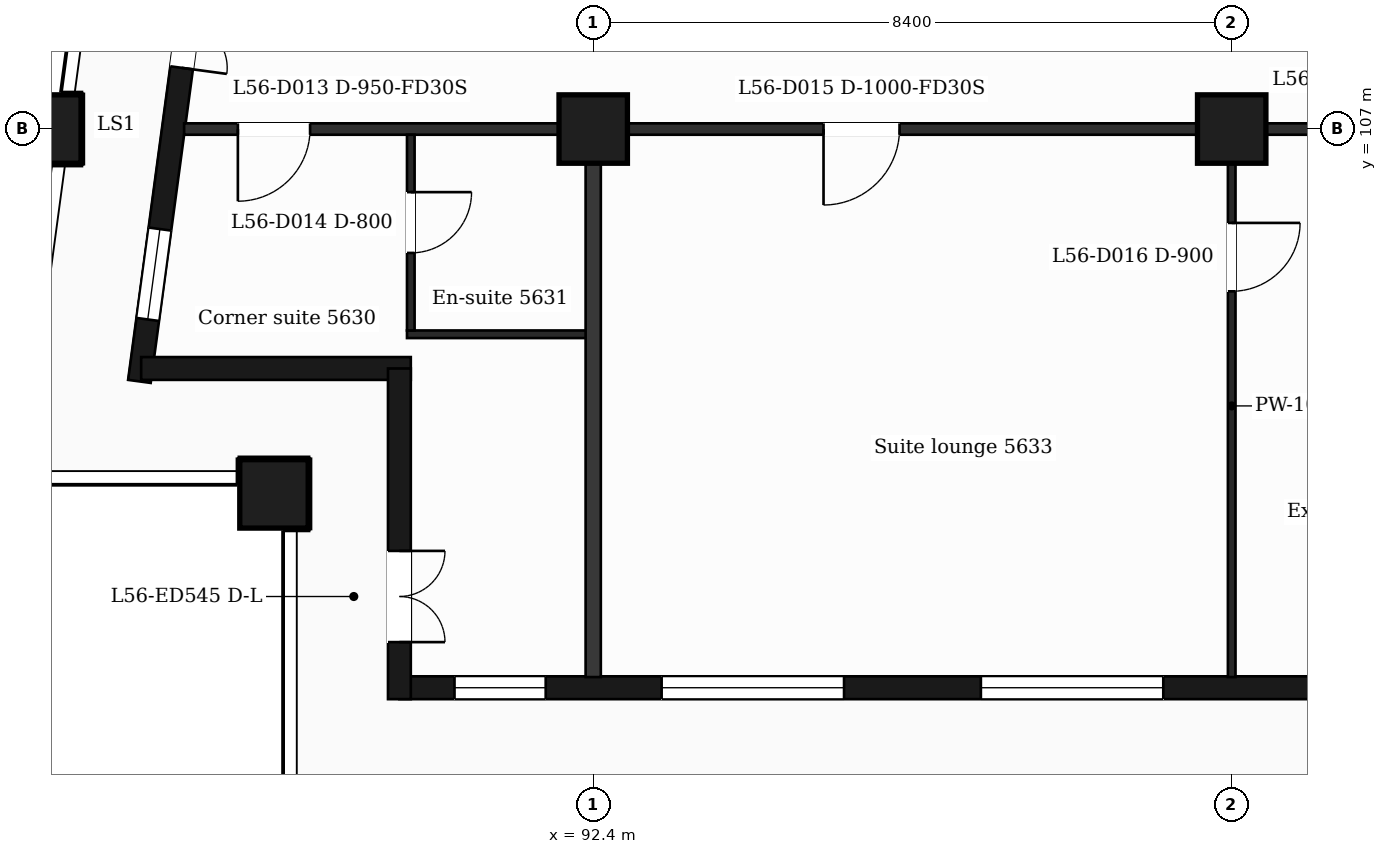
"""IFC4 building model, lengths in metres.
Left out: names, types, materials, properties, quantities, classifications, styles, units other than length and angle.
Written with IfcOpenShell. Run it as: python <this file> out.ifc"""

import sys

from ifc_helpers import new_model, si_unit, direction, frame, frame_2d, origin, origin_2d, place, context, subcontext, project, spatial, rectangle, extrude, element, fill, save


model = new_model("IFC4")
c1 = context("Model", 3, precision=1e-05, world=origin(), true_north=direction((0.0, 1.0)))
c2 = subcontext(c1, "Body", "Model", "MODEL_VIEW")
j1 = project(units=[si_unit("LENGTHUNIT", "METRE"), si_unit("PLANEANGLEUNIT", "RADIAN")], contexts=[c1])
p1 = place(None, origin())
s1 = spatial("IfcSite", under=j1, at=p1, CompositionType="ELEMENT")
p2 = place(p1, origin())
s2 = spatial("IfcBuilding", under=s1, at=p2, CompositionType="ELEMENT")
p3 = place(p2, frame((0.0, 0.0, 231.8)))
s3 = spatial("IfcBuildingStorey", under=s2, at=p3, CompositionType="ELEMENT", Elevation=231.8)
for number, where, z_axis, x_axis in (
    (1, (88.2, 102.2, 0.0), (0.0, 0.0, 1.0), (1.0, 0.0, 0.0)),
    (2, (92.4, 107.0, 0.0), (0.0, 0.0, 1.0), (1.0, 0.0, 0.0)),
    (3, (100.8, 107.0, 0.0), (0.0, 0.0, 1.0), (1.0, 0.0, 0.0)),
    (4, (85.211, 107.0, 0.0), (0.0, 0.0, 1.0), (1.0, 0.0, 0.0)),
):
    element("IfcColumn", number, at=place(p3, frame(where, z_axis=z_axis, x_axis=x_axis)), inside=s3, PredefinedType="COLUMN", context=c2, shape_type="SweptSolid", body=[
        extrude(rectangle(XDim=0.9, YDim=0.9, at=origin_2d()), origin(), (0.0, 0.0, 1.0), 3.7),
    ])
p4 = place(p3, frame((89.85, 99.65, 0.0), z_axis=(0.0, 0.0, 1.0), x_axis=(1.0, 0.0, 0.0)))
e5 = element("IfcWall", 5, at=p4, inside=s3, PredefinedType="SOLIDWALL", context=c2, shape_type="SweptSolid", body=[
    extrude(rectangle(XDim=47.25, YDim=0.3, at=frame_2d((23.625, 0.0))), origin(), (0.0, 0.0, 1.0), 3.38),
])
p5 = place(p4, frame((0.725, 0.0, 0.9)))
e6 = element("IfcOpeningElement", 6, at=p5, cuts=e5, PredefinedType="OPENING", context=c2, shape_type="SweptSolid", body=[
    extrude(rectangle(XDim=1.2, YDim=2.1, at=frame_2d((0.6, 1.05))), frame((0.0, 0.16, 0.0), z_axis=(0.0, -1.0, 0.0), x_axis=(1.0, 0.0, 0.0)), (0.0, 0.0, 1.0), 0.32),
])
p6 = place(p4, frame((3.45, 0.0, 0.9)))
e7 = element("IfcOpeningElement", 7, at=p6, cuts=e5, PredefinedType="OPENING", context=c2, shape_type="SweptSolid", body=[
    extrude(rectangle(XDim=2.4, YDim=2.1, at=frame_2d((1.2, 1.05))), frame((0.0, 0.16, 0.0), z_axis=(0.0, -1.0, 0.0), x_axis=(1.0, 0.0, 0.0)), (0.0, 0.0, 1.0), 0.32),
])
p7 = place(p4, frame((7.65, 0.0, 0.9)))
e8 = element("IfcOpeningElement", 8, at=p7, cuts=e5, PredefinedType="OPENING", context=c2, shape_type="SweptSolid", body=[
    extrude(rectangle(XDim=2.4, YDim=2.1, at=frame_2d((1.2, 1.05))), frame((0.0, 0.16, 0.0), z_axis=(0.0, -1.0, 0.0), x_axis=(1.0, 0.0, 0.0)), (0.0, 0.0, 1.0), 0.32),
])
p8 = place(p4, frame((12.45, 0.0, 0.9)))
e9 = element("IfcOpeningElement", 9, at=p8, cuts=e5, PredefinedType="OPENING", context=c2, shape_type="SweptSolid", body=[
    extrude(rectangle(XDim=1.2, YDim=2.1, at=frame_2d((0.6, 1.05))), frame((0.0, 0.16, 0.0), z_axis=(0.0, -1.0, 0.0), x_axis=(1.0, 0.0, 0.0)), (0.0, 0.0, 1.0), 0.32),
])
p9 = place(p4, frame((16.65, 0.0, 0.9)))
e10 = element("IfcOpeningElement", 10, at=p9, cuts=e5, PredefinedType="OPENING", context=c2, shape_type="SweptSolid", body=[
    extrude(rectangle(XDim=1.2, YDim=2.1, at=frame_2d((0.6, 1.05))), frame((0.0, 0.16, 0.0), z_axis=(0.0, -1.0, 0.0), x_axis=(1.0, 0.0, 0.0)), (0.0, 0.0, 1.0), 0.32),
])
p10 = place(p4, frame((19.95, 0.0, 0.0)))
e11 = element("IfcOpeningElement", 11, at=p10, cuts=e5, PredefinedType="OPENING", context=c2, shape_type="SweptSolid", body=[
    extrude(rectangle(XDim=1.2, YDim=2.4, at=frame_2d((0.6, 1.2))), frame((0.0, 0.16, 0.0), z_axis=(0.0, -1.0, 0.0), x_axis=(1.0, 0.0, 0.0)), (0.0, 0.0, 1.0), 0.32),
])
p11 = place(p4, frame((21.75, 0.0, 0.9)))
e12 = element("IfcOpeningElement", 12, at=p11, cuts=e5, PredefinedType="OPENING", context=c2, shape_type="SweptSolid", body=[
    extrude(rectangle(XDim=1.2, YDim=2.1, at=frame_2d((0.6, 1.05))), frame((0.0, 0.16, 0.0), z_axis=(0.0, -1.0, 0.0), x_axis=(1.0, 0.0, 0.0)), (0.0, 0.0, 1.0), 0.32),
])
p12 = place(p4, frame((24.45, 0.0, 0.9)))
e13 = element("IfcOpeningElement", 13, at=p12, cuts=e5, PredefinedType="OPENING", context=c2, shape_type="SweptSolid", body=[
    extrude(rectangle(XDim=2.4, YDim=2.1, at=frame_2d((1.2, 1.05))), frame((0.0, 0.16, 0.0), z_axis=(0.0, -1.0, 0.0), x_axis=(1.0, 0.0, 0.0)), (0.0, 0.0, 1.0), 0.32),
])
p13 = place(p4, frame((28.35, 0.0, 0.0)))
e14 = element("IfcOpeningElement", 14, at=p13, cuts=e5, PredefinedType="OPENING", context=c2, shape_type="SweptSolid", body=[
    extrude(rectangle(XDim=1.2, YDim=2.4, at=frame_2d((0.6, 1.2))), frame((0.0, 0.16, 0.0), z_axis=(0.0, -1.0, 0.0), x_axis=(1.0, 0.0, 0.0)), (0.0, 0.0, 1.0), 0.32),
])
p14 = place(p4, frame((30.15, 0.0, 0.9)))
e15 = element("IfcOpeningElement", 15, at=p14, cuts=e5, PredefinedType="OPENING", context=c2, shape_type="SweptSolid", body=[
    extrude(rectangle(XDim=1.2, YDim=2.1, at=frame_2d((0.6, 1.05))), frame((0.0, 0.16, 0.0), z_axis=(0.0, -1.0, 0.0), x_axis=(1.0, 0.0, 0.0)), (0.0, 0.0, 1.0), 0.32),
])
p15 = place(p4, frame((32.85, 0.0, 0.9)))
e16 = element("IfcOpeningElement", 16, at=p15, cuts=e5, PredefinedType="OPENING", context=c2, shape_type="SweptSolid", body=[
    extrude(rectangle(XDim=2.4, YDim=2.1, at=frame_2d((1.2, 1.05))), frame((0.0, 0.16, 0.0), z_axis=(0.0, -1.0, 0.0), x_axis=(1.0, 0.0, 0.0)), (0.0, 0.0, 1.0), 0.32),
])
p16 = place(p4, frame((37.05, 0.0, 0.9)))
e17 = element("IfcOpeningElement", 17, at=p16, cuts=e5, PredefinedType="OPENING", context=c2, shape_type="SweptSolid", body=[
    extrude(rectangle(XDim=2.4, YDim=2.1, at=frame_2d((1.2, 1.05))), frame((0.0, 0.16, 0.0), z_axis=(0.0, -1.0, 0.0), x_axis=(1.0, 0.0, 0.0)), (0.0, 0.0, 1.0), 0.32),
])
p17 = place(p4, frame((41.85, 0.0, 0.9)))
e18 = element("IfcOpeningElement", 18, at=p17, cuts=e5, PredefinedType="OPENING", context=c2, shape_type="SweptSolid", body=[
    extrude(rectangle(XDim=1.2, YDim=2.1, at=frame_2d((0.6, 1.05))), frame((0.0, 0.16, 0.0), z_axis=(0.0, -1.0, 0.0), x_axis=(1.0, 0.0, 0.0)), (0.0, 0.0, 1.0), 0.32),
])
p18 = place(p4, frame((45.25, 0.0, 0.9)))
e19 = element("IfcOpeningElement", 19, at=p18, cuts=e5, PredefinedType="OPENING", context=c2, shape_type="SweptSolid", body=[
    extrude(rectangle(XDim=1.2, YDim=2.1, at=frame_2d((0.6, 1.05))), frame((0.0, 0.16, 0.0), z_axis=(0.0, -1.0, 0.0), x_axis=(1.0, 0.0, 0.0)), (0.0, 0.0, 1.0), 0.32),
])
p19 = place(p3, frame((87.334, 110.4, 0.0), z_axis=(0.0, 0.0, 1.0), x_axis=(-0.133437175554, -0.991057273915, 0.0)))
e20 = element("IfcWall", 20, at=p19, inside=s3, PredefinedType="SOLIDWALL", context=c2, shape_type="SweptSolid", body=[
    extrude(rectangle(XDim=6.781, YDim=0.3, at=frame_2d((3.39, 0.0))), origin(), (0.0, 0.0, 1.0), 3.38),
])
p20 = place(p19, frame((1.418, 0.0, 0.0)))
e21 = element("IfcOpeningElement", 21, at=p20, cuts=e20, PredefinedType="OPENING", context=c2, shape_type="SweptSolid", body=[
    extrude(rectangle(XDim=1.2, YDim=2.4, at=frame_2d((0.6, 1.2))), frame((0.0, 0.16, 0.0), z_axis=(0.0, -1.0, 0.0), x_axis=(1.0, 0.0, 0.0)), (0.0, 0.0, 1.0), 0.32),
])
p21 = place(p19, frame((4.758, 0.0, 0.9)))
e22 = element("IfcOpeningElement", 22, at=p21, cuts=e20, PredefinedType="OPENING", context=c2, shape_type="SweptSolid", body=[
    extrude(rectangle(XDim=1.2, YDim=2.1, at=frame_2d((0.6, 1.05))), frame((0.0, 0.16, 0.0), z_axis=(0.0, -1.0, 0.0), x_axis=(1.0, 0.0, 0.0)), (0.0, 0.0, 1.0), 0.32),
])
p22 = place(p3, frame((86.452, 103.85, 0.0), z_axis=(0.0, 0.0, 1.0), x_axis=(1.0, 0.0, 0.0)))
e23 = element("IfcWall", 23, at=p22, inside=s3, PredefinedType="SOLIDWALL", context=c2, shape_type="SweptSolid", body=[
    extrude(rectangle(XDim=3.548, YDim=0.3, at=frame_2d((1.774, 0.0))), origin(), (0.0, 0.0, 1.0), 3.38),
])
p23 = place(p3, frame((89.85, 103.85, 0.0), z_axis=(0.0, 0.0, 1.0), x_axis=(0.0, -1.0, 0.0)))
e24 = element("IfcWall", 24, at=p23, inside=s3, PredefinedType="SOLIDWALL", context=c2, shape_type="SweptSolid", body=[
    extrude(rectangle(XDim=4.35, YDim=0.3, at=frame_2d((2.175, 0.0))), origin(), (0.0, 0.0, 1.0), 3.38),
])
p24 = place(p23, frame((2.4, 0.0, 0.0)))
e25 = element("IfcOpeningElement", 25, at=p24, cuts=e24, PredefinedType="OPENING", context=c2, shape_type="SweptSolid", body=[
    extrude(rectangle(XDim=1.2, YDim=2.4, at=frame_2d((0.6, 1.2))), frame((0.0, 0.16, 0.0), z_axis=(0.0, -1.0, 0.0), x_axis=(1.0, 0.0, 0.0)), (0.0, 0.0, 1.0), 0.32),
])
p25 = place(p3, frame((89.95, 104.3, 0.0), z_axis=(0.0, 0.0, 1.0), x_axis=(1.0, 0.0, 0.0)))
e26 = element("IfcWall", 26, at=p25, inside=s3, PredefinedType="PARTITIONING", context=c2, shape_type="SweptSolid", body=[
    extrude(rectangle(XDim=2.45, YDim=0.1, at=frame_2d((1.225, 0.0))), origin(), (0.0, 0.0, 1.0), 3.38),
])
p26 = place(p3, frame((87.018, 107.0, 0.0), z_axis=(0.0, 0.0, 1.0), x_axis=(1.0, 0.0, 0.0)))
e27 = element("IfcWall", 27, at=p26, inside=s3, PredefinedType="PARTITIONING", context=c2, shape_type="SweptSolid", body=[
    extrude(rectangle(XDim=52.765, YDim=0.15, at=frame_2d((26.382, 0.0))), origin(), (0.0, 0.0, 1.0), 3.38),
])
p27 = place(p26, frame((0.707, 0.0, 0.0)))
e28 = element("IfcOpeningElement", 28, at=p27, cuts=e27, PredefinedType="OPENING", context=c2, shape_type="SweptSolid", body=[
    extrude(rectangle(XDim=0.95, YDim=2.1, at=frame_2d((0.475, 1.05))), frame((0.0, 0.085, 0.0), z_axis=(0.0, -1.0, 0.0), x_axis=(1.0, 0.0, 0.0)), (0.0, 0.0, 1.0), 0.17),
])
p28 = place(p26, frame((8.412, 0.0, 0.0)))
e29 = element("IfcOpeningElement", 29, at=p28, cuts=e27, PredefinedType="OPENING", context=c2, shape_type="SweptSolid", body=[
    extrude(rectangle(XDim=1.0, YDim=2.1, at=frame_2d((0.5, 1.05))), frame((0.0, 0.085, 0.0), z_axis=(0.0, -1.0, 0.0), x_axis=(1.0, 0.0, 0.0)), (0.0, 0.0, 1.0), 0.17),
])
p29 = place(p26, frame((20.482, 0.0, 0.0)))
e30 = element("IfcOpeningElement", 30, at=p29, cuts=e27, PredefinedType="OPENING", context=c2, shape_type="SweptSolid", body=[
    extrude(rectangle(XDim=1.0, YDim=2.1, at=frame_2d((0.5, 1.05))), frame((0.0, 0.085, 0.0), z_axis=(0.0, -1.0, 0.0), x_axis=(1.0, 0.0, 0.0)), (0.0, 0.0, 1.0), 0.17),
])
p30 = place(p26, frame((22.882, 0.0, 0.0)))
e31 = element("IfcOpeningElement", 31, at=p30, cuts=e27, PredefinedType="OPENING", context=c2, shape_type="SweptSolid", body=[
    extrude(rectangle(XDim=1.0, YDim=2.1, at=frame_2d((0.5, 1.05))), frame((0.0, 0.085, 0.0), z_axis=(0.0, -1.0, 0.0), x_axis=(1.0, 0.0, 0.0)), (0.0, 0.0, 1.0), 0.17),
])
p31 = place(p26, frame((32.607, 0.0, 0.0)))
e32 = element("IfcOpeningElement", 32, at=p31, cuts=e27, PredefinedType="OPENING", context=c2, shape_type="SweptSolid", body=[
    extrude(rectangle(XDim=1.0, YDim=2.1, at=frame_2d((0.5, 1.05))), frame((0.0, 0.085, 0.0), z_axis=(0.0, -1.0, 0.0), x_axis=(1.0, 0.0, 0.0)), (0.0, 0.0, 1.0), 0.17),
])
p32 = place(p26, frame((39.707, 0.0, 0.0)))
e33 = element("IfcOpeningElement", 33, at=p32, cuts=e27, PredefinedType="OPENING", context=c2, shape_type="SweptSolid", body=[
    extrude(rectangle(XDim=0.95, YDim=2.1, at=frame_2d((0.475, 1.05))), frame((0.0, 0.085, 0.0), z_axis=(0.0, -1.0, 0.0), x_axis=(1.0, 0.0, 0.0)), (0.0, 0.0, 1.0), 0.17),
])
p33 = place(p26, frame((43.457, 0.0, 0.0)))
e34 = element("IfcOpeningElement", 34, at=p33, cuts=e27, PredefinedType="OPENING", context=c2, shape_type="SweptSolid", body=[
    extrude(rectangle(XDim=0.95, YDim=2.1, at=frame_2d((0.475, 1.05))), frame((0.0, 0.085, 0.0), z_axis=(0.0, -1.0, 0.0), x_axis=(1.0, 0.0, 0.0)), (0.0, 0.0, 1.0), 0.17),
])
p34 = place(p26, frame((49.285, 0.0, 0.0)))
e35 = element("IfcOpeningElement", 35, at=p34, cuts=e27, PredefinedType="OPENING", context=c2, shape_type="SweptSolid", body=[
    extrude(rectangle(XDim=0.95, YDim=2.1, at=frame_2d((0.475, 1.05))), frame((0.0, 0.085, 0.0), z_axis=(0.0, -1.0, 0.0), x_axis=(1.0, 0.0, 0.0)), (0.0, 0.0, 1.0), 0.17),
])
p35 = place(p3, frame((90.0, 104.35, 0.0), z_axis=(0.0, 0.0, 1.0), x_axis=(0.0, 1.0, 0.0)))
e36 = element("IfcWall", 36, at=p35, inside=s3, PredefinedType="PARTITIONING", context=c2, shape_type="SweptSolid", body=[
    extrude(rectangle(XDim=2.575, YDim=0.1, at=frame_2d((1.288, 0.0))), origin(), (0.0, 0.0, 1.0), 3.38),
])
p36 = place(p35, frame((1.02, 0.0, 0.0)))
e37 = element("IfcOpeningElement", 37, at=p36, cuts=e36, PredefinedType="OPENING", context=c2, shape_type="SweptSolid", body=[
    extrude(rectangle(XDim=0.8, YDim=2.1, at=frame_2d((0.4, 1.05))), frame((0.0, 0.06, 0.0), z_axis=(0.0, -1.0, 0.0), x_axis=(1.0, 0.0, 0.0)), (0.0, 0.0, 1.0), 0.12),
])
p37 = place(p3, frame((92.4, 99.79, 0.0), z_axis=(0.0, 0.0, 1.0), x_axis=(0.0, 1.0, 0.0)))
e38 = element("IfcWall", 38, at=p37, inside=s3, PredefinedType="PARTITIONING", context=c2, shape_type="SweptSolid", body=[
    extrude(rectangle(XDim=7.135, YDim=0.2, at=frame_2d((3.567, 0.0))), origin(), (0.0, 0.0, 1.0), 3.38),
])
p38 = place(p3, frame((100.8, 99.79, 0.0), z_axis=(0.0, 0.0, 1.0), x_axis=(0.0, 1.0, 0.0)))
e39 = element("IfcWall", 39, at=p38, inside=s3, PredefinedType="PARTITIONING", context=c2, shape_type="SweptSolid", body=[
    extrude(rectangle(XDim=7.135, YDim=0.1, at=frame_2d((3.567, 0.0))), origin(), (0.0, 0.0, 1.0), 3.38),
])
p39 = place(p38, frame((5.075, 0.0, 0.0)))
e40 = element("IfcOpeningElement", 40, at=p39, cuts=e39, PredefinedType="OPENING", context=c2, shape_type="SweptSolid", body=[
    extrude(rectangle(XDim=0.9, YDim=2.1, at=frame_2d((0.45, 1.05))), frame((0.0, 0.06, 0.0), z_axis=(0.0, -1.0, 0.0), x_axis=(1.0, 0.0, 0.0)), (0.0, 0.0, 1.0), 0.12),
])
p40 = place(p5, origin())
e41 = element("IfcWindow", 41, at=p40, inside=s3, PartitioningType="SINGLE_PANEL", PredefinedType="WINDOW", context=c2, shape_type="SweptSolid", body=[
    extrude(rectangle(XDim=1.2, YDim=2.1, at=frame_2d((0.6, 1.05))), frame((0.0, 0.03, 0.0), z_axis=(0.0, -1.0, 0.0), x_axis=(1.0, 0.0, 0.0)), (0.0, 0.0, 1.0), 0.06),
])
fill(e6, e41)
p41 = place(p6, origin())
e42 = element("IfcWindow", 42, at=p41, inside=s3, PartitioningType="SINGLE_PANEL", PredefinedType="WINDOW", context=c2, shape_type="SweptSolid", body=[
    extrude(rectangle(XDim=2.4, YDim=2.1, at=frame_2d((1.2, 1.05))), frame((0.0, 0.03, 0.0), z_axis=(0.0, -1.0, 0.0), x_axis=(1.0, 0.0, 0.0)), (0.0, 0.0, 1.0), 0.06),
])
fill(e7, e42)
p42 = place(p7, origin())
e43 = element("IfcWindow", 43, at=p42, inside=s3, PartitioningType="SINGLE_PANEL", PredefinedType="WINDOW", context=c2, shape_type="SweptSolid", body=[
    extrude(rectangle(XDim=2.4, YDim=2.1, at=frame_2d((1.2, 1.05))), frame((0.0, 0.03, 0.0), z_axis=(0.0, -1.0, 0.0), x_axis=(1.0, 0.0, 0.0)), (0.0, 0.0, 1.0), 0.06),
])
fill(e8, e43)
p43 = place(p20, origin())
e44 = element("IfcDoor", 44, at=p43, inside=s3, OperationType="DOUBLE_DOOR_SINGLE_SWING", PredefinedType="DOOR", context=c2, shape_type="SweptSolid", body=[
    extrude(rectangle(XDim=1.2, YDim=2.4, at=frame_2d((0.6, 1.2))), frame((0.0, 0.025, 0.0), z_axis=(0.0, -1.0, 0.0), x_axis=(1.0, 0.0, 0.0)), (0.0, 0.0, 1.0), 0.05),
])
fill(e21, e44)
p44 = place(p21, origin())
e45 = element("IfcWindow", 45, at=p44, inside=s3, PartitioningType="SINGLE_PANEL", PredefinedType="WINDOW", context=c2, shape_type="SweptSolid", body=[
    extrude(rectangle(XDim=1.2, YDim=2.1, at=frame_2d((0.6, 1.05))), frame((0.0, 0.03, 0.0), z_axis=(0.0, -1.0, 0.0), x_axis=(1.0, 0.0, 0.0)), (0.0, 0.0, 1.0), 0.06),
])
fill(e22, e45)
p45 = place(p24, origin())
e46 = element("IfcDoor", 46, at=p45, inside=s3, OperationType="DOUBLE_DOOR_SINGLE_SWING", PredefinedType="DOOR", context=c2, shape_type="SweptSolid", body=[
    extrude(rectangle(XDim=1.2, YDim=2.4, at=frame_2d((0.6, 1.2))), frame((0.0, 0.025, 0.0), z_axis=(0.0, -1.0, 0.0), x_axis=(1.0, 0.0, 0.0)), (0.0, 0.0, 1.0), 0.05),
])
fill(e25, e46)
p46 = place(p27, origin())
e47 = element("IfcDoor", 47, at=p46, inside=s3, OperationType="SINGLE_SWING_LEFT", PredefinedType="DOOR", context=c2, shape_type="SweptSolid", body=[
    extrude(rectangle(XDim=0.95, YDim=2.1, at=frame_2d((0.475, 1.05))), frame((0.0, 0.025, 0.0), z_axis=(0.0, -1.0, 0.0), x_axis=(1.0, 0.0, 0.0)), (0.0, 0.0, 1.0), 0.05),
])
fill(e28, e47)
p47 = place(p36, origin())
e48 = element("IfcDoor", 48, at=p47, inside=s3, OperationType="SINGLE_SWING_RIGHT", PredefinedType="DOOR", context=c2, shape_type="SweptSolid", body=[
    extrude(rectangle(XDim=0.8, YDim=2.1, at=frame_2d((0.4, 1.05))), frame((0.0, 0.025, 0.0), z_axis=(0.0, -1.0, 0.0), x_axis=(1.0, 0.0, 0.0)), (0.0, 0.0, 1.0), 0.05),
])
fill(e37, e48)
p48 = place(p28, origin())
e49 = element("IfcDoor", 49, at=p48, inside=s3, OperationType="SINGLE_SWING_LEFT", PredefinedType="DOOR", context=c2, shape_type="SweptSolid", body=[
    extrude(rectangle(XDim=1.0, YDim=2.1, at=frame_2d((0.5, 1.05))), frame((0.0, 0.025, 0.0), z_axis=(0.0, -1.0, 0.0), x_axis=(1.0, 0.0, 0.0)), (0.0, 0.0, 1.0), 0.05),
])
fill(e29, e49)
p49 = place(p39, origin())
e50 = element("IfcDoor", 50, at=p49, inside=s3, OperationType="SINGLE_SWING_RIGHT", PredefinedType="DOOR", context=c2, shape_type="SweptSolid", body=[
    extrude(rectangle(XDim=0.9, YDim=2.1, at=frame_2d((0.45, 1.05))), frame((0.0, 0.025, 0.0), z_axis=(0.0, -1.0, 0.0), x_axis=(1.0, 0.0, 0.0)), (0.0, 0.0, 1.0), 0.05),
])
fill(e40, e50)
save(model, sys.argv[1])
